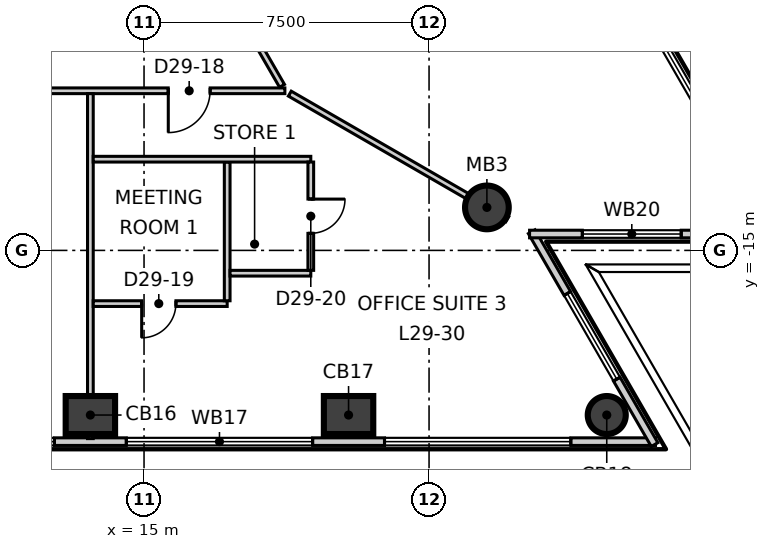
"""IFC4 building model, lengths in metres.
Left out: names, types, materials, properties, quantities, classifications, styles, units other than length and angle.
Written with IfcOpenShell. Run it as: python <this file> out.ifc"""

import sys

from ifc_helpers import new_model, si_unit, direction, frame, frame_2d, origin, origin_2d, place, context, subcontext, project, spatial, rectangle, circle, extrude, element, fill, save


model = new_model("IFC4")
c1 = context("Model", 3, precision=1e-05, world=origin(), true_north=direction((0.0, 1.0)))
c2 = subcontext(c1, "Body", "Model", "MODEL_VIEW")
j1 = project(units=[si_unit("LENGTHUNIT", "METRE"), si_unit("PLANEANGLEUNIT", "RADIAN")], contexts=[c1])
p1 = place(None, origin())
s1 = spatial("IfcSite", under=j1, at=p1, CompositionType="ELEMENT")
p2 = place(p1, origin())
s2 = spatial("IfcBuilding", under=s1, at=p2, CompositionType="ELEMENT")
p3 = place(p2, frame((0.0, 0.0, 128.3)))
s3 = spatial("IfcBuildingStorey", under=s2, at=p3, CompositionType="ELEMENT", Elevation=128.3)
for number, where, z_axis, x_axis in (
    (1, (13.588, -19.332, -0.3), (0.0, 0.0, 1.0), (1.0, 0.0, 0.0)),
    (2, (20.382, -19.332, -0.3), (0.0, 0.0, 1.0), (1.0, 0.0, 0.0)),
):
    element("IfcColumn", number, at=place(p3, frame(where, z_axis=z_axis, x_axis=x_axis)), inside=s3, PredefinedType="COLUMN", context=c2, shape_type="SweptSolid", body=[
        extrude(rectangle(XDim=1.3, YDim=1.0, at=origin_2d()), origin(), (0.0, 0.0, 1.0), 4.0),
    ])
p4 = place(p3, frame((27.176, -19.332, -0.3), z_axis=(0.0, 0.0, 1.0), x_axis=(1.0, 0.0, 0.0)))
e3 = element("IfcColumn", 3, at=p4, inside=s3, PredefinedType="COLUMN", context=c2, shape_type="SweptSolid", body=[
    extrude(circle(Radius=0.5, at=origin_2d()), origin(), (0.0, 0.0, 1.0), 4.0),
])
p5 = place(p3, frame((24.022, -13.869, -0.3), z_axis=(0.0, 0.0, 1.0), x_axis=(1.0, 0.0, 0.0)))
e4 = element("IfcColumn", 4, at=p5, inside=s3, PredefinedType="COLUMN", context=c2, shape_type="SweptSolid", body=[
    extrude(circle(Radius=0.575, at=origin_2d()), origin(), (0.0, 0.0, 1.0), 4.0),
])
p6 = place(p3, frame((-28.479, -20.032, 0.0), z_axis=(0.0, 0.0, 1.0), x_axis=(1.0, 0.0, 0.0)))
e5 = element("IfcWall", 5, at=p6, inside=s3, PredefinedType="ELEMENTEDWALL", context=c2, shape_type="SweptSolid", body=[
    extrude(rectangle(XDim=56.938, YDim=0.2, at=frame_2d((28.469, 0.0))), origin(), (0.0, 0.0, 1.0), 3.7),
])
p7 = place(p6, frame((2.25, 0.0, 0.9)))
e6 = element("IfcOpeningElement", 6, at=p7, cuts=e5, PredefinedType="OPENING", context=c2, shape_type="SweptSolid", body=[
    extrude(rectangle(XDim=4.9, YDim=2.5, at=frame_2d((2.45, 1.25))), frame((0.0, 0.11, 0.0), z_axis=(0.0, -1.0, 0.0), x_axis=(1.0, 0.0, 0.0)), (0.0, 0.0, 1.0), 0.22),
])
p8 = place(p6, frame((9.044, 0.0, 0.9)))
e7 = element("IfcOpeningElement", 7, at=p8, cuts=e5, PredefinedType="OPENING", context=c2, shape_type="SweptSolid", body=[
    extrude(rectangle(XDim=4.9, YDim=2.5, at=frame_2d((2.45, 1.25))), frame((0.0, 0.11, 0.0), z_axis=(0.0, -1.0, 0.0), x_axis=(1.0, 0.0, 0.0)), (0.0, 0.0, 1.0), 0.22),
])
p9 = place(p6, frame((15.838, 0.0, 0.9)))
e8 = element("IfcOpeningElement", 8, at=p9, cuts=e5, PredefinedType="OPENING", context=c2, shape_type="SweptSolid", body=[
    extrude(rectangle(XDim=4.9, YDim=2.5, at=frame_2d((2.45, 1.25))), frame((0.0, 0.11, 0.0), z_axis=(0.0, -1.0, 0.0), x_axis=(1.0, 0.0, 0.0)), (0.0, 0.0, 1.0), 0.22),
])
p10 = place(p6, frame((22.632, 0.0, 0.9)))
e9 = element("IfcOpeningElement", 9, at=p10, cuts=e5, PredefinedType="OPENING", context=c2, shape_type="SweptSolid", body=[
    extrude(rectangle(XDim=4.9, YDim=2.5, at=frame_2d((2.45, 1.25))), frame((0.0, 0.11, 0.0), z_axis=(0.0, -1.0, 0.0), x_axis=(1.0, 0.0, 0.0)), (0.0, 0.0, 1.0), 0.22),
])
p11 = place(p6, frame((29.426, 0.0, 0.9)))
e10 = element("IfcOpeningElement", 10, at=p11, cuts=e5, PredefinedType="OPENING", context=c2, shape_type="SweptSolid", body=[
    extrude(rectangle(XDim=4.9, YDim=2.5, at=frame_2d((2.45, 1.25))), frame((0.0, 0.11, 0.0), z_axis=(0.0, -1.0, 0.0), x_axis=(1.0, 0.0, 0.0)), (0.0, 0.0, 1.0), 0.22),
])
p12 = place(p6, frame((36.22, 0.0, 0.9)))
e11 = element("IfcOpeningElement", 11, at=p12, cuts=e5, PredefinedType="OPENING", context=c2, shape_type="SweptSolid", body=[
    extrude(rectangle(XDim=4.9, YDim=2.5, at=frame_2d((2.45, 1.25))), frame((0.0, 0.11, 0.0), z_axis=(0.0, -1.0, 0.0), x_axis=(1.0, 0.0, 0.0)), (0.0, 0.0, 1.0), 0.22),
])
p13 = place(p6, frame((43.014, 0.0, 0.9)))
e12 = element("IfcOpeningElement", 12, at=p13, cuts=e5, PredefinedType="OPENING", context=c2, shape_type="SweptSolid", body=[
    extrude(rectangle(XDim=4.9, YDim=2.5, at=frame_2d((2.45, 1.25))), frame((0.0, 0.11, 0.0), z_axis=(0.0, -1.0, 0.0), x_axis=(1.0, 0.0, 0.0)), (0.0, 0.0, 1.0), 0.22),
])
p14 = place(p6, frame((49.808, 0.0, 0.9)))
e13 = element("IfcOpeningElement", 13, at=p14, cuts=e5, PredefinedType="OPENING", context=c2, shape_type="SweptSolid", body=[
    extrude(rectangle(XDim=4.9, YDim=2.5, at=frame_2d((2.45, 1.25))), frame((0.0, 0.11, 0.0), z_axis=(0.0, -1.0, 0.0), x_axis=(1.0, 0.0, 0.0)), (0.0, 0.0, 1.0), 0.22),
])
p15 = place(p3, frame((28.434, -20.11, 0.0), z_axis=(0.0, 0.0, 1.0), x_axis=(-0.499975110204, 0.866039773438, 0.0)))
e14 = element("IfcWall", 14, at=p15, inside=s3, PredefinedType="ELEMENTEDWALL", context=c2, shape_type="SweptSolid", body=[
    extrude(rectangle(XDim=6.469, YDim=0.2, at=frame_2d((3.234, 0.0))), origin(), (0.0, 0.0, 1.0), 3.7),
])
p16 = place(p15, frame((1.99, 0.0, 0.9)))
e15 = element("IfcOpeningElement", 15, at=p16, cuts=e14, PredefinedType="OPENING", context=c2, shape_type="SweptSolid", body=[
    extrude(rectangle(XDim=2.6, YDim=2.5, at=frame_2d((1.3, 1.25))), frame((0.0, 0.11, 0.0), z_axis=(0.0, -1.0, 0.0), x_axis=(1.0, 0.0, 0.0)), (0.0, 0.0, 1.0), 0.22),
])
p17 = place(p3, frame((25.145, -14.569, 0.0), z_axis=(0.0, 0.0, 1.0), x_axis=(1.0, 0.0, 0.0)))
e16 = element("IfcWall", 16, at=p17, inside=s3, PredefinedType="ELEMENTEDWALL", context=c2, shape_type="SweptSolid", body=[
    extrude(rectangle(XDim=6.468, YDim=0.2, at=frame_2d((3.234, 0.0))), origin(), (0.0, 0.0, 1.0), 3.7),
])
p18 = place(p17, frame((1.39, 0.0, 0.9)))
e17 = element("IfcOpeningElement", 17, at=p18, cuts=e16, PredefinedType="OPENING", context=c2, shape_type="SweptSolid", body=[
    extrude(rectangle(XDim=2.6, YDim=2.5, at=frame_2d((1.3, 1.25))), frame((0.0, 0.11, 0.0), z_axis=(0.0, -1.0, 0.0), x_axis=(1.0, 0.0, 0.0)), (0.0, 0.0, 1.0), 0.22),
])
p19 = place(p3, frame((31.588, -14.647, 0.0), z_axis=(0.0, 0.0, 1.0), x_axis=(-0.500005036527, 0.866022495925, 0.0)))
e18 = element("IfcWall", 18, at=p19, inside=s3, PredefinedType="ELEMENTEDWALL", context=c2, shape_type="SweptSolid", body=[
    extrude(rectangle(XDim=56.938, YDim=0.2, at=frame_2d((28.469, 0.0))), origin(), (0.0, 0.0, 1.0), 3.7),
])
p20 = place(p19, frame((2.25, 0.0, 0.9)))
e19 = element("IfcOpeningElement", 19, at=p20, cuts=e18, PredefinedType="OPENING", context=c2, shape_type="SweptSolid", body=[
    extrude(rectangle(XDim=4.9, YDim=2.5, at=frame_2d((2.45, 1.25))), frame((0.0, 0.11, 0.0), z_axis=(0.0, -1.0, 0.0), x_axis=(1.0, 0.0, 0.0)), (0.0, 0.0, 1.0), 0.22),
])
p21 = place(p19, frame((9.044, 0.0, 0.9)))
e20 = element("IfcOpeningElement", 20, at=p21, cuts=e18, PredefinedType="OPENING", context=c2, shape_type="SweptSolid", body=[
    extrude(rectangle(XDim=4.9, YDim=2.5, at=frame_2d((2.45, 1.25))), frame((0.0, 0.11, 0.0), z_axis=(0.0, -1.0, 0.0), x_axis=(1.0, 0.0, 0.0)), (0.0, 0.0, 1.0), 0.22),
])
p22 = place(p19, frame((15.838, 0.0, 0.9)))
e21 = element("IfcOpeningElement", 21, at=p22, cuts=e18, PredefinedType="OPENING", context=c2, shape_type="SweptSolid", body=[
    extrude(rectangle(XDim=4.9, YDim=2.5, at=frame_2d((2.45, 1.25))), frame((0.0, 0.11, 0.0), z_axis=(0.0, -1.0, 0.0), x_axis=(1.0, 0.0, 0.0)), (0.0, 0.0, 1.0), 0.22),
])
p23 = place(p19, frame((22.632, 0.0, 0.9)))
e22 = element("IfcOpeningElement", 22, at=p23, cuts=e18, PredefinedType="OPENING", context=c2, shape_type="SweptSolid", body=[
    extrude(rectangle(XDim=4.9, YDim=2.5, at=frame_2d((2.45, 1.25))), frame((0.0, 0.11, 0.0), z_axis=(0.0, -1.0, 0.0), x_axis=(1.0, 0.0, 0.0)), (0.0, 0.0, 1.0), 0.22),
])
p24 = place(p19, frame((29.426, 0.0, 0.9)))
e23 = element("IfcOpeningElement", 23, at=p24, cuts=e18, PredefinedType="OPENING", context=c2, shape_type="SweptSolid", body=[
    extrude(rectangle(XDim=4.9, YDim=2.5, at=frame_2d((2.45, 1.25))), frame((0.0, 0.11, 0.0), z_axis=(0.0, -1.0, 0.0), x_axis=(1.0, 0.0, 0.0)), (0.0, 0.0, 1.0), 0.22),
])
p25 = place(p19, frame((36.22, 0.0, 0.9)))
e24 = element("IfcOpeningElement", 24, at=p25, cuts=e18, PredefinedType="OPENING", context=c2, shape_type="SweptSolid", body=[
    extrude(rectangle(XDim=4.9, YDim=2.5, at=frame_2d((2.45, 1.25))), frame((0.0, 0.11, 0.0), z_axis=(0.0, -1.0, 0.0), x_axis=(1.0, 0.0, 0.0)), (0.0, 0.0, 1.0), 0.22),
])
p26 = place(p19, frame((43.014, 0.0, 0.9)))
e25 = element("IfcOpeningElement", 25, at=p26, cuts=e18, PredefinedType="OPENING", context=c2, shape_type="SweptSolid", body=[
    extrude(rectangle(XDim=4.9, YDim=2.5, at=frame_2d((2.45, 1.25))), frame((0.0, 0.11, 0.0), z_axis=(0.0, -1.0, 0.0), x_axis=(1.0, 0.0, 0.0)), (0.0, 0.0, 1.0), 0.22),
])
p27 = place(p19, frame((49.808, 0.0, 0.9)))
e26 = element("IfcOpeningElement", 26, at=p27, cuts=e18, PredefinedType="OPENING", context=c2, shape_type="SweptSolid", body=[
    extrude(rectangle(XDim=4.9, YDim=2.5, at=frame_2d((2.45, 1.25))), frame((0.0, 0.11, 0.0), z_axis=(0.0, -1.0, 0.0), x_axis=(1.0, 0.0, 0.0)), (0.0, 0.0, 1.0), 0.22),
])
p28 = place(p3, frame((0.901, -10.8, 0.0), z_axis=(0.0, 0.0, 1.0), x_axis=(1.0, 0.0, 0.0)))
e27 = element("IfcWall", 27, at=p28, inside=s3, PredefinedType="PARTITIONING", context=c2, shape_type="SweptSolid", body=[
    extrude(rectangle(XDim=17.805, YDim=0.15, at=frame_2d((8.903, 0.0))), origin(), (0.0, 0.0, 1.0), 3.7),
])
p29 = place(p28, frame((10.149, 0.0, 0.0)))
e28 = element("IfcOpeningElement", 28, at=p29, cuts=e27, PredefinedType="OPENING", context=c2, shape_type="SweptSolid", body=[
    extrude(rectangle(XDim=1.1, YDim=2.1, at=frame_2d((0.55, 1.05))), frame((0.0, 0.085, 0.0), z_axis=(0.0, -1.0, 0.0), x_axis=(1.0, 0.0, 0.0)), (0.0, 0.0, 1.0), 0.17),
])
p30 = place(p28, frame((4.349, 0.0, 0.0)))
e29 = element("IfcOpeningElement", 29, at=p30, cuts=e27, PredefinedType="OPENING", context=c2, shape_type="SweptSolid", body=[
    extrude(rectangle(XDim=0.9, YDim=2.1, at=frame_2d((0.45, 1.05))), frame((0.0, 0.085, 0.0), z_axis=(0.0, -1.0, 0.0), x_axis=(1.0, 0.0, 0.0)), (0.0, 0.0, 1.0), 0.17),
])
p31 = place(p28, frame((7.149, 0.0, 0.0)))
e30 = element("IfcOpeningElement", 30, at=p31, cuts=e27, PredefinedType="OPENING", context=c2, shape_type="SweptSolid", body=[
    extrude(rectangle(XDim=1.0, YDim=2.1, at=frame_2d((0.5, 1.05))), frame((0.0, 0.085, 0.0), z_axis=(0.0, -1.0, 0.0), x_axis=(1.0, 0.0, 0.0)), (0.0, 0.0, 1.0), 0.17),
])
p32 = place(p28, frame((14.737, 0.0, 0.0)))
e31 = element("IfcOpeningElement", 31, at=p32, cuts=e27, PredefinedType="OPENING", context=c2, shape_type="SweptSolid", body=[
    extrude(rectangle(XDim=1.1, YDim=2.1, at=frame_2d((0.55, 1.05))), frame((0.0, 0.085, 0.0), z_axis=(0.0, -1.0, 0.0), x_axis=(1.0, 0.0, 0.0)), (0.0, 0.0, 1.0), 0.17),
])
p33 = place(p3, frame((18.836, -10.875, 0.0), z_axis=(0.0, 0.0, 1.0), x_axis=(0.866045319897, -0.499965502695, 0.0)))
e32 = element("IfcWall", 32, at=p33, inside=s3, PredefinedType="PARTITIONING", context=c2, shape_type="SweptSolid", body=[
    extrude(rectangle(XDim=6.608, YDim=0.15, at=frame_2d((3.304, 0.0))), origin(), (0.0, 0.0, 1.0), 3.15),
])
p34 = place(p3, frame((13.201, -1.264, 0.0), z_axis=(0.0, 0.0, 1.0), x_axis=(0.499973466559, -0.866040722332, 0.0)))
e33 = element("IfcWall", 33, at=p34, inside=s3, PredefinedType="PARTITIONING", context=c2, shape_type="SweptSolid", body=[
    extrude(rectangle(XDim=10.861, YDim=0.15, at=frame_2d((5.43, 0.0))), origin(), (0.0, 0.0, 1.0), 3.7),
])
p35 = place(p34, frame((4.96, 0.0, 0.0)))
e34 = element("IfcOpeningElement", 34, at=p35, cuts=e33, PredefinedType="OPENING", context=c2, shape_type="SweptSolid", body=[
    extrude(rectangle(XDim=1.1, YDim=2.1, at=frame_2d((0.55, 1.05))), frame((0.0, 0.085, 0.0), z_axis=(0.0, -1.0, 0.0), x_axis=(1.0, 0.0, 0.0)), (0.0, 0.0, 1.0), 0.17),
])
p36 = place(p3, frame((13.588, -19.952, 0.0), z_axis=(0.0, 0.0, 1.0), x_axis=(0.0, 1.0, 0.0)))
e35 = element("IfcWall", 35, at=p36, inside=s3, PredefinedType="PARTITIONING", context=c2, shape_type="SweptSolid", body=[
    extrude(rectangle(XDim=9.077, YDim=0.15, at=frame_2d((4.539, 0.0))), origin(), (0.0, 0.0, 1.0), 3.7),
])
p37 = place(p3, frame((13.663, -16.4, 0.0), z_axis=(0.0, 0.0, 1.0), x_axis=(1.0, 0.0, 0.0)))
e36 = element("IfcWall", 36, at=p37, inside=s3, PredefinedType="PARTITIONING", context=c2, shape_type="SweptSolid", body=[
    extrude(rectangle(XDim=3.525, YDim=0.15, at=frame_2d((1.762, 0.0))), origin(), (0.0, 0.0, 1.0), 3.7),
])
p38 = place(p37, frame((1.275, 0.0, 0.0)))
e37 = element("IfcOpeningElement", 37, at=p38, cuts=e36, PredefinedType="OPENING", context=c2, shape_type="SweptSolid", body=[
    extrude(rectangle(XDim=0.9, YDim=2.1, at=frame_2d((0.45, 1.05))), frame((0.0, 0.085, 0.0), z_axis=(0.0, -1.0, 0.0), x_axis=(1.0, 0.0, 0.0)), (0.0, 0.0, 1.0), 0.17),
])
p39 = place(p3, frame((17.188, -16.325, 0.0), z_axis=(0.0, 0.0, 1.0), x_axis=(0.0, 1.0, 0.0)))
e38 = element("IfcWall", 38, at=p39, inside=s3, PredefinedType="PARTITIONING", context=c2, shape_type="SweptSolid", body=[
    extrude(rectangle(XDim=3.65, YDim=0.15, at=frame_2d((1.825, 0.0))), origin(), (0.0, 0.0, 1.0), 3.7),
])
p40 = place(p3, frame((13.663, -12.6, 0.0), z_axis=(0.0, 0.0, 1.0), x_axis=(1.0, 0.0, 0.0)))
e39 = element("IfcWall", 39, at=p40, inside=s3, PredefinedType="PARTITIONING", context=c2, shape_type="SweptSolid", body=[
    extrude(rectangle(XDim=5.725, YDim=0.15, at=frame_2d((2.862, 0.0))), origin(), (0.0, 0.0, 1.0), 3.7),
])
p41 = place(p3, frame((17.263, -15.6, 0.0), z_axis=(0.0, 0.0, 1.0), x_axis=(1.0, 0.0, 0.0)))
e40 = element("IfcWall", 40, at=p41, inside=s3, PredefinedType="PARTITIONING", context=c2, shape_type="SweptSolid", body=[
    extrude(rectangle(XDim=2.125, YDim=0.15, at=frame_2d((1.062, 0.0))), origin(), (0.0, 0.0, 1.0), 3.7),
])
p42 = place(p3, frame((19.388, -15.525, 0.0), z_axis=(0.0, 0.0, 1.0), x_axis=(0.0, 1.0, 0.0)))
e41 = element("IfcWall", 41, at=p42, inside=s3, PredefinedType="PARTITIONING", context=c2, shape_type="SweptSolid", body=[
    extrude(rectangle(XDim=2.85, YDim=0.15, at=frame_2d((1.425, 0.0))), origin(), (0.0, 0.0, 1.0), 3.7),
])
p43 = place(p42, frame((0.975, 0.0, 0.0)))
e42 = element("IfcOpeningElement", 42, at=p43, cuts=e41, PredefinedType="OPENING", context=c2, shape_type="SweptSolid", body=[
    extrude(rectangle(XDim=0.9, YDim=2.1, at=frame_2d((0.45, 1.05))), frame((0.0, 0.085, 0.0), z_axis=(0.0, -1.0, 0.0), x_axis=(1.0, 0.0, 0.0)), (0.0, 0.0, 1.0), 0.17),
])
p44 = place(p12, origin())
e43 = element("IfcWindow", 43, at=p44, inside=s3, PartitioningType="SINGLE_PANEL", PredefinedType="WINDOW", context=c2, shape_type="SweptSolid", body=[
    extrude(rectangle(XDim=4.9, YDim=2.5, at=frame_2d((2.45, 1.25))), frame((0.0, 0.03, 0.0), z_axis=(0.0, -1.0, 0.0), x_axis=(1.0, 0.0, 0.0)), (0.0, 0.0, 1.0), 0.06),
])
fill(e11, e43)
p45 = place(p13, origin())
e44 = element("IfcWindow", 44, at=p45, inside=s3, PartitioningType="SINGLE_PANEL", PredefinedType="WINDOW", context=c2, shape_type="SweptSolid", body=[
    extrude(rectangle(XDim=4.9, YDim=2.5, at=frame_2d((2.45, 1.25))), frame((0.0, 0.03, 0.0), z_axis=(0.0, -1.0, 0.0), x_axis=(1.0, 0.0, 0.0)), (0.0, 0.0, 1.0), 0.06),
])
fill(e12, e44)
p46 = place(p14, origin())
e45 = element("IfcWindow", 45, at=p46, inside=s3, PartitioningType="SINGLE_PANEL", PredefinedType="WINDOW", context=c2, shape_type="SweptSolid", body=[
    extrude(rectangle(XDim=4.9, YDim=2.5, at=frame_2d((2.45, 1.25))), frame((0.0, 0.03, 0.0), z_axis=(0.0, -1.0, 0.0), x_axis=(1.0, 0.0, 0.0)), (0.0, 0.0, 1.0), 0.06),
])
fill(e13, e45)
p47 = place(p16, origin())
e46 = element("IfcWindow", 46, at=p47, inside=s3, PartitioningType="SINGLE_PANEL", PredefinedType="WINDOW", context=c2, shape_type="SweptSolid", body=[
    extrude(rectangle(XDim=2.6, YDim=2.5, at=frame_2d((1.3, 1.25))), frame((0.0, 0.03, 0.0), z_axis=(0.0, -1.0, 0.0), x_axis=(1.0, 0.0, 0.0)), (0.0, 0.0, 1.0), 0.06),
])
fill(e15, e46)
p48 = place(p18, origin())
e47 = element("IfcWindow", 47, at=p48, inside=s3, PartitioningType="SINGLE_PANEL", PredefinedType="WINDOW", context=c2, shape_type="SweptSolid", body=[
    extrude(rectangle(XDim=2.6, YDim=2.5, at=frame_2d((1.3, 1.25))), frame((0.0, 0.03, 0.0), z_axis=(0.0, -1.0, 0.0), x_axis=(1.0, 0.0, 0.0)), (0.0, 0.0, 1.0), 0.06),
])
fill(e17, e47)
p49 = place(p20, origin())
e48 = element("IfcWindow", 48, at=p49, inside=s3, PartitioningType="SINGLE_PANEL", PredefinedType="WINDOW", context=c2, shape_type="SweptSolid", body=[
    extrude(rectangle(XDim=4.9, YDim=2.5, at=frame_2d((2.45, 1.25))), frame((0.0, 0.03, 0.0), z_axis=(0.0, -1.0, 0.0), x_axis=(1.0, 0.0, 0.0)), (0.0, 0.0, 1.0), 0.06),
])
fill(e19, e48)
p50 = place(p32, origin())
e49 = element("IfcDoor", 49, at=p50, inside=s3, OperationType="SINGLE_SWING_LEFT", PredefinedType="DOOR", context=c2, shape_type="SweptSolid", body=[
    extrude(rectangle(XDim=1.1, YDim=2.1, at=frame_2d((0.55, 1.05))), frame((0.0, 0.025, 0.0), z_axis=(0.0, -1.0, 0.0), x_axis=(1.0, 0.0, 0.0)), (0.0, 0.0, 1.0), 0.05),
])
fill(e31, e49)
p51 = place(p38, origin())
e50 = element("IfcDoor", 50, at=p51, inside=s3, OperationType="SINGLE_SWING_LEFT", PredefinedType="DOOR", context=c2, shape_type="SweptSolid", body=[
    extrude(rectangle(XDim=0.9, YDim=2.1, at=frame_2d((0.45, 1.05))), frame((0.0, 0.025, 0.0), z_axis=(0.0, -1.0, 0.0), x_axis=(1.0, 0.0, 0.0)), (0.0, 0.0, 1.0), 0.05),
])
fill(e37, e50)
p52 = place(p43, origin())
e51 = element("IfcDoor", 51, at=p52, inside=s3, OperationType="SINGLE_SWING_RIGHT", PredefinedType="DOOR", context=c2, shape_type="SweptSolid", body=[
    extrude(rectangle(XDim=0.9, YDim=2.1, at=frame_2d((0.45, 1.05))), frame((0.0, 0.025, 0.0), z_axis=(0.0, -1.0, 0.0), x_axis=(1.0, 0.0, 0.0)), (0.0, 0.0, 1.0), 0.05),
])
fill(e42, e51)
save(model, sys.argv[1])
